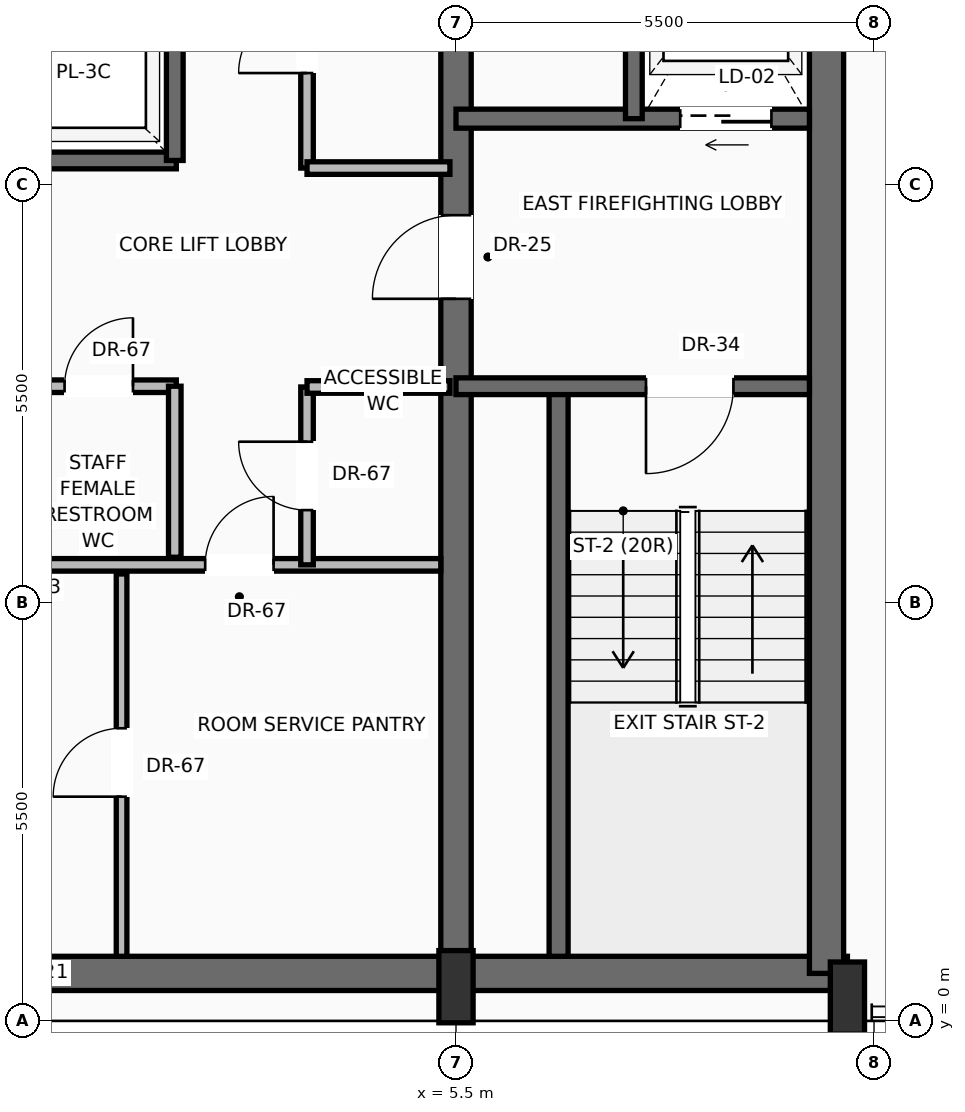
"""IFC4 building model, lengths in metres.
Left out: names, types, materials, properties, quantities, classifications, styles, units other than length and angle.
Written with IfcOpenShell. Run it as: python <this file> out.ifc"""

import sys

from ifc_helpers import new_model, si_unit, direction, frame, frame_2d, origin, origin_2d, place, context, subcontext, project, spatial, rectangle, extrude, source, transform, mapped, element, fill, save


model = new_model("IFC4")
c1 = context("Model", 3, precision=1e-05, world=origin(), true_north=direction((0.0, 1.0)))
c2 = subcontext(c1, "Body", "Model", "MODEL_VIEW")
j1 = project(units=[si_unit("LENGTHUNIT", "METRE"), si_unit("PLANEANGLEUNIT", "RADIAN")], contexts=[c1])
p1 = place(None, origin())
s1 = spatial("IfcSite", under=j1, at=p1, CompositionType="ELEMENT")
p2 = place(p1, origin())
s2 = spatial("IfcBuilding", under=s1, at=p2, CompositionType="ELEMENT")
p3 = place(p2, frame((0.0, 0.0, 266.1)))
s3 = spatial("IfcBuildingStorey", under=s2, at=p3, CompositionType="ELEMENT", Elevation=266.1)
p4 = place(p3, frame((-10.65, 0.625, 0.0), z_axis=(0.0, 0.0, 1.0), x_axis=(1.0, 0.0, 0.0)))
e1 = element("IfcWall", 1, at=p4, inside=s3, PredefinedType="SHEAR", context=c2, shape_type="SweptSolid", body=[
    extrude(rectangle(XDim=21.3, YDim=0.45, at=frame_2d((10.65, 0.0))), origin(), (0.0, 0.0, 1.0), 3.24),
])
p5 = place(p3, frame((10.375, 0.625, 0.0), z_axis=(0.0, 0.0, 1.0), x_axis=(0.0, 1.0, 0.0)))
e2 = element("IfcWall", 2, at=p5, inside=s3, PredefinedType="SHEAR", context=c2, shape_type="SweptSolid", body=[
    extrude(rectangle(XDim=15.35, YDim=0.45, at=frame_2d((7.675, 0.0))), origin(), (0.0, 0.0, 1.0), 3.24),
])
p6 = place(p3, frame((5.5, 0.625, 0.0), z_axis=(0.0, 0.0, 1.0), x_axis=(0.0, 1.0, 0.0)))
e3 = element("IfcWall", 3, at=p6, inside=s3, PredefinedType="SHEAR", context=c2, shape_type="SweptSolid", body=[
    extrude(rectangle(XDim=15.35, YDim=0.4, at=frame_2d((7.675, 0.0))), origin(), (0.0, 0.0, 1.0), 3.24),
])
p7 = place(p6, frame((8.875, 0.0, 0.0)))
e4 = element("IfcOpeningElement", 4, at=p7, cuts=e3, PredefinedType="OPENING", context=c2, shape_type="SweptSolid", body=[
    extrude(rectangle(XDim=1.1, YDim=2.2, at=frame_2d((0.55, 1.1))), frame((0.0, 0.21, 0.0), z_axis=(0.0, -1.0, 0.0), x_axis=(1.0, 0.0, 0.0)), (0.0, 0.0, 1.0), 0.42),
])
m1 = source(origin(), c2, "Body", "SweptSolid", [
    extrude(rectangle(XDim=0.45, YDim=0.95, at=origin_2d()), origin(), (0.0, 0.0, 1.0), 3.45),
])
for number, where, z_axis, x_axis in (
    (5, (5.5, 0.45, 0.0), (0.0, 0.0, 1.0), (1.0, 0.0, 0.0)),
    (6, (10.65, 0.3, 0.0), (0.0, 0.0, 1.0), (1.0, 0.0, 0.0)),
):
    element("IfcColumn", number, at=place(p3, frame(where, z_axis=z_axis, x_axis=x_axis)), inside=s3, PredefinedType="PILASTER", context=c2, shape_type="MappedRepresentation", body=[
        mapped(m1, transform((0.0, 0.0, 0.0), scale=1.0)),
    ])
p8 = place(p3, frame((6.85, 0.85, 0.0), z_axis=(0.0, 0.0, 1.0), x_axis=(0.0, 1.0, 0.0)))
e7 = element("IfcWall", 7, at=p8, inside=s3, PredefinedType="SOLIDWALL", context=c2, shape_type="SweptSolid", body=[
    extrude(rectangle(XDim=7.5, YDim=0.25, at=frame_2d((3.75, 0.0))), origin(), (0.0, 0.0, 1.0), 3.24),
])
p9 = place(p3, frame((10.15, 8.35, 0.0), z_axis=(0.0, 0.0, 1.0), x_axis=(-1.0, 0.0, 0.0)))
e8 = element("IfcWall", 8, at=p9, inside=s3, PredefinedType="SOLIDWALL", context=c2, shape_type="SweptSolid", body=[
    extrude(rectangle(XDim=4.65, YDim=0.22, at=frame_2d((2.325, 0.0))), origin(), (0.0, 0.0, 1.0), 3.24),
])
p10 = place(p9, frame((1.0, 0.0, 0.0)))
e9 = element("IfcOpeningElement", 9, at=p10, cuts=e8, PredefinedType="OPENING", context=c2, shape_type="SweptSolid", body=[
    extrude(rectangle(XDim=1.15, YDim=2.2, at=frame_2d((0.575, 1.1))), frame((0.0, 0.12, 0.0), z_axis=(0.0, -1.0, 0.0), x_axis=(1.0, 0.0, 0.0)), (0.0, 0.0, 1.0), 0.24),
])
p11 = place(p3, frame((10.15, 11.87, 0.0), z_axis=(0.0, 0.0, 1.0), x_axis=(-1.0, 0.0, 0.0)))
e10 = element("IfcWall", 10, at=p11, inside=s3, PredefinedType="SOLIDWALL", context=c2, shape_type="SweptSolid", body=[
    extrude(rectangle(XDim=4.65, YDim=0.25, at=frame_2d((2.325, 0.0))), origin(), (0.0, 0.0, 1.0), 3.24),
])
p12 = place(p11, frame((0.5, 0.0, 0.0)))
e11 = element("IfcOpeningElement", 11, at=p12, cuts=e10, PredefinedType="OPENING", context=c2, shape_type="SweptSolid", body=[
    extrude(rectangle(XDim=1.2, YDim=2.25, at=frame_2d((0.6, 1.125))), frame((0.0, 0.135, 0.0), z_axis=(0.0, -1.0, 0.0), x_axis=(1.0, 0.0, 0.0)), (0.0, 0.0, 1.0), 0.27),
])
p13 = place(p3, frame((7.84, 11.87, 0.0), z_axis=(0.0, 0.0, 1.0), x_axis=(0.0, 1.0, 0.0)))
e12 = element("IfcWall", 12, at=p13, inside=s3, PredefinedType="SOLIDWALL", context=c2, shape_type="SweptSolid", body=[
    extrude(rectangle(XDim=3.88, YDim=0.22, at=frame_2d((1.94, 0.0))), origin(), (0.0, 0.0, 1.0), 3.24),
])
p14 = place(p3, frame((-5.5, 6.0, 0.0), z_axis=(0.0, 0.0, 1.0), x_axis=(1.0, 0.0, 0.0)))
e13 = element("IfcWall", 13, at=p14, inside=s3, PredefinedType="PARTITIONING", context=c2, shape_type="SweptSolid", body=[
    extrude(rectangle(XDim=10.8, YDim=0.165, at=frame_2d((5.4, 0.0))), origin(), (0.0, 0.0, 1.0), 3.232),
])
p15 = place(p14, frame((7.7, 0.0, 0.0)))
e14 = element("IfcOpeningElement", 14, at=p15, cuts=e13, PredefinedType="OPENING", context=c2, shape_type="SweptSolid", body=[
    extrude(rectangle(XDim=0.9, YDim=2.1, at=frame_2d((0.45, 1.05))), frame((0.0, 0.093, 0.0), z_axis=(0.0, -1.0, 0.0), x_axis=(1.0, 0.0, 0.0)), (0.0, 0.0, 1.0), 0.185),
])
p16 = place(p3, frame((1.1, 0.85, 0.0), z_axis=(0.0, 0.0, 1.0), x_axis=(0.0, 1.0, 0.0)))
e15 = element("IfcWall", 15, at=p16, inside=s3, PredefinedType="PARTITIONING", context=c2, shape_type="SweptSolid", body=[
    extrude(rectangle(XDim=5.03, YDim=0.14, at=frame_2d((2.515, 0.0))), origin(), (0.0, 0.0, 1.0), 3.232),
])
p17 = place(p16, frame((2.1, 0.0, 0.0)))
e16 = element("IfcOpeningElement", 16, at=p17, cuts=e15, PredefinedType="OPENING", context=c2, shape_type="SweptSolid", body=[
    extrude(rectangle(XDim=0.9, YDim=2.1, at=frame_2d((0.45, 1.05))), frame((0.0, 0.08, 0.0), z_axis=(0.0, -1.0, 0.0), x_axis=(1.0, 0.0, 0.0)), (0.0, 0.0, 1.0), 0.16),
])
p18 = place(p3, frame((3.54, 6.0, 0.0), z_axis=(0.0, 0.0, 1.0), x_axis=(0.0, 1.0, 0.0)))
e17 = element("IfcWall", 17, at=p18, inside=s3, PredefinedType="PARTITIONING", context=c2, shape_type="SweptSolid", body=[
    extrude(rectangle(XDim=2.34, YDim=0.165, at=frame_2d((1.17, 0.0))), origin(), (0.0, 0.0, 1.0), 3.232),
])
p19 = place(p18, frame((0.72, 0.0, 0.0)))
e18 = element("IfcOpeningElement", 18, at=p19, cuts=e17, PredefinedType="OPENING", context=c2, shape_type="SweptSolid", body=[
    extrude(rectangle(XDim=0.9, YDim=2.1, at=frame_2d((0.45, 1.05))), frame((0.0, 0.093, 0.0), z_axis=(0.0, -1.0, 0.0), x_axis=(1.0, 0.0, 0.0)), (0.0, 0.0, 1.0), 0.185),
])
p20 = place(p3, frame((3.54, 8.34, 0.0), z_axis=(0.0, 0.0, 1.0), x_axis=(1.0, 0.0, 0.0)))
e19 = element("IfcWall", 19, at=p20, inside=s3, PredefinedType="PARTITIONING", context=c2, shape_type="SweptSolid", body=[
    extrude(rectangle(XDim=1.88, YDim=0.165, at=frame_2d((0.94, 0.0))), origin(), (0.0, 0.0, 1.0), 3.232),
])
p21 = place(p3, frame((-5.3, 8.35, 0.0), z_axis=(0.0, 0.0, 1.0), x_axis=(1.0, 0.0, 0.0)))
e20 = element("IfcWall", 20, at=p21, inside=s3, PredefinedType="PARTITIONING", context=c2, shape_type="SweptSolid", body=[
    extrude(rectangle(XDim=7.12, YDim=0.165, at=frame_2d((3.56, 0.0))), origin(), (0.0, 0.0, 1.0), 3.232),
])
p22 = place(p21, frame((0.85, 0.0, 0.0)))
e21 = element("IfcOpeningElement", 21, at=p22, cuts=e20, PredefinedType="OPENING", context=c2, shape_type="SweptSolid", body=[
    extrude(rectangle(XDim=0.9, YDim=2.1, at=frame_2d((0.45, 1.05))), frame((0.0, 0.093, 0.0), z_axis=(0.0, -1.0, 0.0), x_axis=(1.0, 0.0, 0.0)), (0.0, 0.0, 1.0), 0.185),
])
p23 = place(p21, frame((5.65, 0.0, 0.0)))
e22 = element("IfcOpeningElement", 22, at=p23, cuts=e20, PredefinedType="OPENING", context=c2, shape_type="SweptSolid", body=[
    extrude(rectangle(XDim=0.9, YDim=2.1, at=frame_2d((0.45, 1.05))), frame((0.0, 0.093, 0.0), z_axis=(0.0, -1.0, 0.0), x_axis=(1.0, 0.0, 0.0)), (0.0, 0.0, 1.0), 0.185),
])
p24 = place(p3, frame((1.8, 6.1, 0.0), z_axis=(0.0, 0.0, 1.0), x_axis=(0.0, 1.0, 0.0)))
e23 = element("IfcWall", 23, at=p24, inside=s3, PredefinedType="PARTITIONING", context=c2, shape_type="SweptSolid", body=[
    extrude(rectangle(XDim=2.25, YDim=0.165, at=frame_2d((1.125, 0.0))), origin(), (0.0, 0.0, 1.0), 3.232),
])
p25 = place(p3, frame((-5.5, 11.32, 0.0), z_axis=(0.0, 0.0, 1.0), x_axis=(1.0, 0.0, 0.0)))
e24 = element("IfcWall", 24, at=p25, inside=s3, PredefinedType="SOLIDWALL", context=c2, shape_type="SweptSolid", body=[
    extrude(rectangle(XDim=7.32, YDim=0.22, at=frame_2d((3.66, 0.0))), origin(), (0.0, 0.0, 1.0), 3.24),
])
p26 = place(p3, frame((1.8, 11.32, 0.0), z_axis=(0.0, 0.0, 1.0), x_axis=(0.0, 1.0, 0.0)))
e25 = element("IfcWall", 25, at=p26, inside=s3, PredefinedType="SOLIDWALL", context=c2, shape_type="SweptSolid", body=[
    extrude(rectangle(XDim=2.3, YDim=0.22, at=frame_2d((1.15, 0.0))), origin(), (0.0, 0.0, 1.0), 3.24),
])
p27 = place(p3, frame((3.54, 11.22, 0.0), z_axis=(0.0, 0.0, 1.0), x_axis=(0.0, 1.0, 0.0)))
e26 = element("IfcWall", 26, at=p27, inside=s3, PredefinedType="PARTITIONING", context=c2, shape_type="SweptSolid", body=[
    extrude(rectangle(XDim=4.53, YDim=0.165, at=frame_2d((2.265, 0.0))), origin(), (0.0, 0.0, 1.0), 3.232),
])
p28 = place(p27, frame((1.25, 0.0, 0.0)))
e27 = element("IfcOpeningElement", 27, at=p28, cuts=e26, PredefinedType="OPENING", context=c2, shape_type="SweptSolid", body=[
    extrude(rectangle(XDim=0.9, YDim=2.1, at=frame_2d((0.45, 1.05))), frame((0.0, 0.093, 0.0), z_axis=(0.0, -1.0, 0.0), x_axis=(1.0, 0.0, 0.0)), (0.0, 0.0, 1.0), 0.185),
])
p29 = place(p3, frame((3.54, 11.22, 0.0), z_axis=(0.0, 0.0, 1.0), x_axis=(1.0, 0.0, 0.0)))
e28 = element("IfcWall", 28, at=p29, inside=s3, PredefinedType="PARTITIONING", context=c2, shape_type="SweptSolid", body=[
    extrude(rectangle(XDim=1.88, YDim=0.165, at=frame_2d((0.94, 0.0))), origin(), (0.0, 0.0, 1.0), 3.232),
])
m2 = source(origin(), c2, "Body", "SweptSolid", [
    extrude(rectangle(XDim=1.15, YDim=2.2, at=frame_2d((0.575, 1.1))), frame((0.0, 0.025, 0.0), z_axis=(0.0, -1.0, 0.0), x_axis=(1.0, 0.0, 0.0)), (0.0, 0.0, 1.0), 0.05),
])
p30 = place(p10, origin())
e29 = element("IfcDoor", 29, at=p30, inside=s3, OperationType="SINGLE_SWING_RIGHT", PredefinedType="DOOR", context=c2, shape_type="MappedRepresentation", body=[
    mapped(m2, transform((0.0, 0.0, 0.0), scale=1.0)),
])
fill(e9, e29)
m3 = source(origin(), c2, "Body", "SweptSolid", [
    extrude(rectangle(XDim=1.1, YDim=2.2, at=frame_2d((0.55, 1.1))), frame((0.0, 0.025, 0.0), z_axis=(0.0, -1.0, 0.0), x_axis=(1.0, 0.0, 0.0)), (0.0, 0.0, 1.0), 0.05),
])
p31 = place(p7, origin())
e30 = element("IfcDoor", 30, at=p31, inside=s3, OperationType="SINGLE_SWING_LEFT", PredefinedType="DOOR", context=c2, shape_type="MappedRepresentation", body=[
    mapped(m3, transform((0.0, 0.0, 0.0), scale=1.0)),
])
fill(e4, e30)
m4 = source(origin(), c2, "Body", "SweptSolid", [
    extrude(rectangle(XDim=1.2, YDim=2.25, at=frame_2d((0.6, 1.125))), frame((0.0, 0.025, 0.0), z_axis=(0.0, -1.0, 0.0), x_axis=(1.0, 0.0, 0.0)), (0.0, 0.0, 1.0), 0.05),
])
p32 = place(p12, origin())
e31 = element("IfcDoor", 31, at=p32, inside=s3, OperationType="SLIDING_TO_RIGHT", PredefinedType="DOOR", context=c2, shape_type="MappedRepresentation", body=[
    mapped(m4, transform((0.0, 0.0, 0.0), scale=1.0)),
])
fill(e11, e31)
m5 = source(origin(), c2, "Body", "SweptSolid", [
    extrude(rectangle(XDim=0.9, YDim=2.1, at=frame_2d((0.45, 1.05))), frame((0.0, 0.025, 0.0), z_axis=(0.0, -1.0, 0.0), x_axis=(1.0, 0.0, 0.0)), (0.0, 0.0, 1.0), 0.05),
])
p33 = place(p15, origin())
e32 = element("IfcDoor", 32, at=p33, inside=s3, OperationType="SINGLE_SWING_RIGHT", PredefinedType="DOOR", context=c2, shape_type="MappedRepresentation", body=[
    mapped(m5, transform((0.0, 0.0, 0.0), scale=1.0)),
])
fill(e14, e32)
p34 = place(p17, origin())
e33 = element("IfcDoor", 33, at=p34, inside=s3, OperationType="SINGLE_SWING_LEFT", PredefinedType="DOOR", context=c2, shape_type="MappedRepresentation", body=[
    mapped(m5, transform((0.0, 0.0, 0.0), scale=1.0)),
])
fill(e16, e33)
p35 = place(p19, origin())
e34 = element("IfcDoor", 34, at=p35, inside=s3, OperationType="SINGLE_SWING_RIGHT", PredefinedType="DOOR", context=c2, shape_type="MappedRepresentation", body=[
    mapped(m5, transform((0.0, 0.0, 0.0), scale=1.0)),
])
fill(e18, e34)
p36 = place(p23, origin())
e35 = element("IfcDoor", 35, at=p36, inside=s3, OperationType="SINGLE_SWING_RIGHT", PredefinedType="DOOR", context=c2, shape_type="MappedRepresentation", body=[
    mapped(m5, transform((0.0, 0.0, 0.0), scale=1.0)),
])
fill(e22, e35)
p37 = place(p28, origin())
e36 = element("IfcDoor", 36, at=p37, inside=s3, OperationType="SINGLE_SWING_LEFT", PredefinedType="DOOR", context=c2, shape_type="MappedRepresentation", body=[
    mapped(m5, transform((0.0, 0.0, 0.0), scale=1.0)),
])
fill(e27, e36)
save(model, sys.argv[1])
